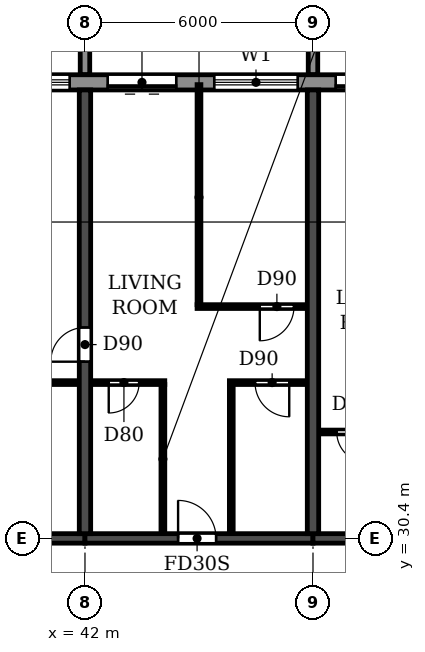
"""IFC4 building model, lengths in metres.
Left out: names, types, materials, properties, quantities, classifications, styles, units other than length and angle.
Written with IfcOpenShell. Run it as: python <this file> out.ifc"""

import sys

from ifc_helpers import new_model, si_unit, direction, frame, frame_2d, origin, place, context, subcontext, project, spatial, polyline, rectangle, outline, extrude, source, transform, mapped, element, fill, save


model = new_model("IFC4")
c1 = context("Model", 3, precision=1e-05, world=origin(), true_north=direction((0.0, 1.0)))
c2 = subcontext(c1, "Body", "Model", "MODEL_VIEW")
j1 = project(units=[si_unit("LENGTHUNIT", "METRE"), si_unit("PLANEANGLEUNIT", "RADIAN")], contexts=[c1])
p1 = place(None, origin())
s1 = spatial("IfcSite", under=j1, at=p1, CompositionType="ELEMENT")
p2 = place(p1, origin())
s2 = spatial("IfcBuilding", under=s1, at=p2, CompositionType="ELEMENT")
p3 = place(p2, frame((0.0, 0.0, 155.4)))
s3 = spatial("IfcBuildingStorey", under=s2, at=p3, CompositionType="ELEMENT", Elevation=155.4)
p4 = place(p3, frame((42.0, 30.525, 0.0), z_axis=(0.0, 0.0, 1.0), x_axis=(0.0, 1.0, 0.0)))
e1 = element("IfcWall", 1, at=p4, inside=s3, PredefinedType="SHEAR", context=c2, shape_type="SweptSolid", body=[
    extrude(rectangle(XDim=11.675, YDim=0.3, at=frame_2d((5.837, 0.0))), origin(), (0.0, 0.0, 1.0), 3.0),
])
p5 = place(p4, frame((4.525, 0.0, 0.0)))
e2 = element("IfcOpeningElement", 2, at=p5, cuts=e1, PredefinedType="OPENING", context=c2, shape_type="SweptSolid", body=[
    extrude(rectangle(XDim=0.9, YDim=2.1, at=frame_2d((0.45, 1.05))), frame((0.0, 0.16, 0.0), z_axis=(0.0, -1.0, 0.0), x_axis=(1.0, 0.0, 0.0)), (0.0, 0.0, 1.0), 0.32),
])
p6 = place(p3, frame((48.0, 30.525, 0.0), z_axis=(0.0, 0.0, 1.0), x_axis=(0.0, 1.0, 0.0)))
e3 = element("IfcWall", 3, at=p6, inside=s3, PredefinedType="SHEAR", context=c2, shape_type="SweptSolid", body=[
    extrude(rectangle(XDim=11.675, YDim=0.3, at=frame_2d((5.837, 0.0))), origin(), (0.0, 0.0, 1.0), 3.0),
])
p7 = place(p3, frame((36.0, 30.4, 0.0), z_axis=(0.0, 0.0, 1.0), x_axis=(1.0, 0.0, 0.0)))
e4 = element("IfcWall", 4, at=p7, inside=s3, PredefinedType="SHEAR", context=c2, shape_type="SweptSolid", body=[
    extrude(rectangle(XDim=6.0, YDim=0.25, at=frame_2d((3.0, 0.0))), origin(), (0.0, 0.0, 1.0), 2.4),
])
p8 = place(p3, frame((42.0, 30.4, 0.0), z_axis=(0.0, 0.0, 1.0), x_axis=(1.0, 0.0, 0.0)))
e5 = element("IfcWall", 5, at=p8, inside=s3, PredefinedType="SHEAR", context=c2, shape_type="SweptSolid", body=[
    extrude(rectangle(XDim=6.0, YDim=0.25, at=frame_2d((3.0, 0.0))), origin(), (0.0, 0.0, 1.0), 2.4),
])
p9 = place(p8, frame((2.45, 0.0, 0.0)))
e6 = element("IfcOpeningElement", 6, at=p9, cuts=e5, PredefinedType="OPENING", context=c2, shape_type="SweptSolid", body=[
    extrude(rectangle(XDim=1.0, YDim=2.1, at=frame_2d((0.5, 1.05))), frame((0.0, 0.135, 0.0), z_axis=(0.0, -1.0, 0.0), x_axis=(1.0, 0.0, 0.0)), (0.0, 0.0, 1.0), 0.27),
])
p10 = place(p3, frame((48.0, 30.4, 0.0), z_axis=(0.0, 0.0, 1.0), x_axis=(1.0, 0.0, 0.0)))
e7 = element("IfcWall", 7, at=p10, inside=s3, PredefinedType="SHEAR", context=c2, shape_type="SweptSolid", body=[
    extrude(rectangle(XDim=6.0, YDim=0.25, at=frame_2d((3.0, 0.0))), origin(), (0.0, 0.0, 1.0), 2.4),
])
p11 = place(p10, frame((2.45, 0.0, 0.0)))
e8 = element("IfcOpeningElement", 8, at=p11, cuts=e7, PredefinedType="OPENING", context=c2, shape_type="SweptSolid", body=[
    extrude(rectangle(XDim=1.0, YDim=2.1, at=frame_2d((0.5, 1.05))), frame((0.0, 0.135, 0.0), z_axis=(0.0, -1.0, 0.0), x_axis=(1.0, 0.0, 0.0)), (0.0, 0.0, 1.0), 0.27),
])
p12 = place(p3, frame((85.317, 42.4, 0.0), z_axis=(0.0, 0.0, 1.0), x_axis=(-1.0, 0.0, 0.0)))
e9 = element("IfcWall", 9, at=p12, inside=s3, PredefinedType="STANDARD", context=c2, shape_type="SweptSolid", body=[
    extrude(rectangle(XDim=68.634, YDim=0.4, at=frame_2d((34.317, 0.0))), origin(), (0.0, 0.0, 1.0), 3.0),
])
p13 = place(p12, frame((64.917, 0.0, 0.0)))
e10 = element("IfcOpeningElement", 10, at=p13, cuts=e9, PredefinedType="OPENING", context=c2, shape_type="SweptSolid", body=[
    extrude(rectangle(XDim=1.8, YDim=2.4, at=frame_2d((0.9, 1.2))), frame((0.0, 0.21, 0.0), z_axis=(0.0, -1.0, 0.0), x_axis=(1.0, 0.0, 0.0)), (0.0, 0.0, 1.0), 0.42),
])
p14 = place(p12, frame((61.717, 0.0, 0.9)))
e11 = element("IfcOpeningElement", 11, at=p14, cuts=e9, PredefinedType="OPENING", context=c2, shape_type="SweptSolid", body=[
    extrude(rectangle(XDim=2.2, YDim=1.5, at=frame_2d((1.1, 0.75))), frame((0.0, 0.21, 0.0), z_axis=(0.0, -1.0, 0.0), x_axis=(1.0, 0.0, 0.0)), (0.0, 0.0, 1.0), 0.42),
])
p15 = place(p12, frame((58.717, 0.0, 0.9)))
e12 = element("IfcOpeningElement", 12, at=p15, cuts=e9, PredefinedType="OPENING", context=c2, shape_type="SweptSolid", body=[
    extrude(rectangle(XDim=2.2, YDim=1.5, at=frame_2d((1.1, 0.75))), frame((0.0, 0.21, 0.0), z_axis=(0.0, -1.0, 0.0), x_axis=(1.0, 0.0, 0.0)), (0.0, 0.0, 1.0), 0.42),
])
p16 = place(p12, frame((55.917, 0.0, 0.0)))
e13 = element("IfcOpeningElement", 13, at=p16, cuts=e9, PredefinedType="OPENING", context=c2, shape_type="SweptSolid", body=[
    extrude(rectangle(XDim=1.8, YDim=2.4, at=frame_2d((0.9, 1.2))), frame((0.0, 0.21, 0.0), z_axis=(0.0, -1.0, 0.0), x_axis=(1.0, 0.0, 0.0)), (0.0, 0.0, 1.0), 0.42),
])
p17 = place(p12, frame((52.917, 0.0, 0.0)))
e14 = element("IfcOpeningElement", 14, at=p17, cuts=e9, PredefinedType="OPENING", context=c2, shape_type="SweptSolid", body=[
    extrude(rectangle(XDim=1.8, YDim=2.4, at=frame_2d((0.9, 1.2))), frame((0.0, 0.21, 0.0), z_axis=(0.0, -1.0, 0.0), x_axis=(1.0, 0.0, 0.0)), (0.0, 0.0, 1.0), 0.42),
])
p18 = place(p12, frame((49.717, 0.0, 0.9)))
e15 = element("IfcOpeningElement", 15, at=p18, cuts=e9, PredefinedType="OPENING", context=c2, shape_type="SweptSolid", body=[
    extrude(rectangle(XDim=2.2, YDim=1.5, at=frame_2d((1.1, 0.75))), frame((0.0, 0.21, 0.0), z_axis=(0.0, -1.0, 0.0), x_axis=(1.0, 0.0, 0.0)), (0.0, 0.0, 1.0), 0.42),
])
p19 = place(p12, frame((46.717, 0.0, 0.9)))
e16 = element("IfcOpeningElement", 16, at=p19, cuts=e9, PredefinedType="OPENING", context=c2, shape_type="SweptSolid", body=[
    extrude(rectangle(XDim=2.2, YDim=1.5, at=frame_2d((1.1, 0.75))), frame((0.0, 0.21, 0.0), z_axis=(0.0, -1.0, 0.0), x_axis=(1.0, 0.0, 0.0)), (0.0, 0.0, 1.0), 0.42),
])
p20 = place(p12, frame((43.717, 0.0, 0.9)))
e17 = element("IfcOpeningElement", 17, at=p20, cuts=e9, PredefinedType="OPENING", context=c2, shape_type="SweptSolid", body=[
    extrude(rectangle(XDim=2.2, YDim=1.5, at=frame_2d((1.1, 0.75))), frame((0.0, 0.21, 0.0), z_axis=(0.0, -1.0, 0.0), x_axis=(1.0, 0.0, 0.0)), (0.0, 0.0, 1.0), 0.42),
])
p21 = place(p12, frame((40.917, 0.0, 0.0)))
e18 = element("IfcOpeningElement", 18, at=p21, cuts=e9, PredefinedType="OPENING", context=c2, shape_type="SweptSolid", body=[
    extrude(rectangle(XDim=1.8, YDim=2.4, at=frame_2d((0.9, 1.2))), frame((0.0, 0.21, 0.0), z_axis=(0.0, -1.0, 0.0), x_axis=(1.0, 0.0, 0.0)), (0.0, 0.0, 1.0), 0.42),
])
p22 = place(p12, frame((37.717, 0.0, 0.9)))
e19 = element("IfcOpeningElement", 19, at=p22, cuts=e9, PredefinedType="OPENING", context=c2, shape_type="SweptSolid", body=[
    extrude(rectangle(XDim=2.2, YDim=1.5, at=frame_2d((1.1, 0.75))), frame((0.0, 0.21, 0.0), z_axis=(0.0, -1.0, 0.0), x_axis=(1.0, 0.0, 0.0)), (0.0, 0.0, 1.0), 0.42),
])
p23 = place(p12, frame((34.917, 0.0, 0.0)))
e20 = element("IfcOpeningElement", 20, at=p23, cuts=e9, PredefinedType="OPENING", context=c2, shape_type="SweptSolid", body=[
    extrude(rectangle(XDim=1.8, YDim=2.4, at=frame_2d((0.9, 1.2))), frame((0.0, 0.21, 0.0), z_axis=(0.0, -1.0, 0.0), x_axis=(1.0, 0.0, 0.0)), (0.0, 0.0, 1.0), 0.42),
])
p24 = place(p12, frame((31.717, 0.0, 0.9)))
e21 = element("IfcOpeningElement", 21, at=p24, cuts=e9, PredefinedType="OPENING", context=c2, shape_type="SweptSolid", body=[
    extrude(rectangle(XDim=2.2, YDim=1.5, at=frame_2d((1.1, 0.75))), frame((0.0, 0.21, 0.0), z_axis=(0.0, -1.0, 0.0), x_axis=(1.0, 0.0, 0.0)), (0.0, 0.0, 1.0), 0.42),
])
p25 = place(p12, frame((28.717, 0.0, 0.9)))
e22 = element("IfcOpeningElement", 22, at=p25, cuts=e9, PredefinedType="OPENING", context=c2, shape_type="SweptSolid", body=[
    extrude(rectangle(XDim=2.2, YDim=1.5, at=frame_2d((1.1, 0.75))), frame((0.0, 0.21, 0.0), z_axis=(0.0, -1.0, 0.0), x_axis=(1.0, 0.0, 0.0)), (0.0, 0.0, 1.0), 0.42),
])
p26 = place(p12, frame((25.717, 0.0, 0.9)))
e23 = element("IfcOpeningElement", 23, at=p26, cuts=e9, PredefinedType="OPENING", context=c2, shape_type="SweptSolid", body=[
    extrude(rectangle(XDim=2.2, YDim=1.5, at=frame_2d((1.1, 0.75))), frame((0.0, 0.21, 0.0), z_axis=(0.0, -1.0, 0.0), x_axis=(1.0, 0.0, 0.0)), (0.0, 0.0, 1.0), 0.42),
])
p27 = place(p12, frame((22.717, 0.0, 0.9)))
e24 = element("IfcOpeningElement", 24, at=p27, cuts=e9, PredefinedType="OPENING", context=c2, shape_type="SweptSolid", body=[
    extrude(rectangle(XDim=2.2, YDim=1.5, at=frame_2d((1.1, 0.75))), frame((0.0, 0.21, 0.0), z_axis=(0.0, -1.0, 0.0), x_axis=(1.0, 0.0, 0.0)), (0.0, 0.0, 1.0), 0.42),
])
p28 = place(p12, frame((19.917, 0.0, 0.0)))
e25 = element("IfcOpeningElement", 25, at=p28, cuts=e9, PredefinedType="OPENING", context=c2, shape_type="SweptSolid", body=[
    extrude(rectangle(XDim=1.8, YDim=2.4, at=frame_2d((0.9, 1.2))), frame((0.0, 0.21, 0.0), z_axis=(0.0, -1.0, 0.0), x_axis=(1.0, 0.0, 0.0)), (0.0, 0.0, 1.0), 0.42),
])
p29 = place(p12, frame((16.717, 0.0, 0.9)))
e26 = element("IfcOpeningElement", 26, at=p29, cuts=e9, PredefinedType="OPENING", context=c2, shape_type="SweptSolid", body=[
    extrude(rectangle(XDim=2.2, YDim=1.5, at=frame_2d((1.1, 0.75))), frame((0.0, 0.21, 0.0), z_axis=(0.0, -1.0, 0.0), x_axis=(1.0, 0.0, 0.0)), (0.0, 0.0, 1.0), 0.42),
])
p30 = place(p12, frame((13.717, 0.0, 0.9)))
e27 = element("IfcOpeningElement", 27, at=p30, cuts=e9, PredefinedType="OPENING", context=c2, shape_type="SweptSolid", body=[
    extrude(rectangle(XDim=2.2, YDim=1.5, at=frame_2d((1.1, 0.75))), frame((0.0, 0.21, 0.0), z_axis=(0.0, -1.0, 0.0), x_axis=(1.0, 0.0, 0.0)), (0.0, 0.0, 1.0), 0.42),
])
p31 = place(p12, frame((10.917, 0.0, 0.0)))
e28 = element("IfcOpeningElement", 28, at=p31, cuts=e9, PredefinedType="OPENING", context=c2, shape_type="SweptSolid", body=[
    extrude(rectangle(XDim=1.8, YDim=2.4, at=frame_2d((0.9, 1.2))), frame((0.0, 0.21, 0.0), z_axis=(0.0, -1.0, 0.0), x_axis=(1.0, 0.0, 0.0)), (0.0, 0.0, 1.0), 0.42),
])
p32 = place(p12, frame((7.717, 0.0, 0.9)))
e29 = element("IfcOpeningElement", 29, at=p32, cuts=e9, PredefinedType="OPENING", context=c2, shape_type="SweptSolid", body=[
    extrude(rectangle(XDim=2.2, YDim=1.5, at=frame_2d((1.1, 0.75))), frame((0.0, 0.21, 0.0), z_axis=(0.0, -1.0, 0.0), x_axis=(1.0, 0.0, 0.0)), (0.0, 0.0, 1.0), 0.42),
])
p33 = place(p12, frame((4.717, 0.0, 0.9)))
e30 = element("IfcOpeningElement", 30, at=p33, cuts=e9, PredefinedType="OPENING", context=c2, shape_type="SweptSolid", body=[
    extrude(rectangle(XDim=2.2, YDim=1.5, at=frame_2d((1.1, 0.75))), frame((0.0, 0.21, 0.0), z_axis=(0.0, -1.0, 0.0), x_axis=(1.0, 0.0, 0.0)), (0.0, 0.0, 1.0), 0.42),
])
p34 = place(p12, frame((1.917, 0.0, 0.0)))
e31 = element("IfcOpeningElement", 31, at=p34, cuts=e9, PredefinedType="OPENING", context=c2, shape_type="SweptSolid", body=[
    extrude(rectangle(XDim=1.8, YDim=2.4, at=frame_2d((0.9, 1.2))), frame((0.0, 0.21, 0.0), z_axis=(0.0, -1.0, 0.0), x_axis=(1.0, 0.0, 0.0)), (0.0, 0.0, 1.0), 0.42),
])
m1 = source(origin(), c2, "Body", "SweptSolid", [
    extrude(outline(polyline([(0.0, 0.0), (0.25, 0.0), (0.25, 3.1), (0.0, 3.1), (0.0, 0.0)])), origin(), (0.0, 0.0, 1.0), 3.1),
])
for number, where in (
    (32, (41.875, 42.6, 0.0)),
    (33, (47.875, 42.6, 0.0)),
):
    element("IfcWall", number, at=place(p3, frame(where)), inside=s3, PredefinedType="STANDARD", context=c2, shape_type="MappedRepresentation", body=[
        mapped(m1, transform((0.0, 0.0, 0.0))),
    ])
p35 = place(p3, frame((48.16, 33.2, 0.0), z_axis=(0.0, 0.0, 1.0), x_axis=(1.0, 0.0, 0.0)))
e34 = element("IfcWall", 34, at=p35, inside=s3, PredefinedType="PARTITIONING", context=c2, shape_type="SweptSolid", body=[
    extrude(rectangle(XDim=1.94, YDim=0.1, at=frame_2d((0.97, 0.0))), origin(), (0.0, 0.0, 1.0), 3.0),
])
p36 = place(p35, frame((0.465, 0.0, 0.0)))
e35 = element("IfcOpeningElement", 35, at=p36, cuts=e34, PredefinedType="OPENING", context=c2, shape_type="SweptSolid", body=[
    extrude(rectangle(XDim=0.8, YDim=2.1, at=frame_2d((0.4, 1.05))), frame((0.0, 0.06, 0.0), z_axis=(0.0, -1.0, 0.0), x_axis=(1.0, 0.0, 0.0)), (0.0, 0.0, 1.0), 0.12),
])
p37 = place(p3, frame((38.9, 34.5, 0.0), z_axis=(0.0, 0.0, 1.0), x_axis=(1.0, 0.0, 0.0)))
e36 = element("IfcWall", 36, at=p37, inside=s3, PredefinedType="PARTITIONING", context=c2, shape_type="SweptSolid", body=[
    extrude(rectangle(XDim=2.94, YDim=0.1, at=frame_2d((1.47, 0.0))), origin(), (0.0, 0.0, 1.0), 3.0),
])
p38 = place(p37, frame((1.2, 0.0, 0.0)))
e37 = element("IfcOpeningElement", 37, at=p38, cuts=e36, PredefinedType="OPENING", context=c2, shape_type="SweptSolid", body=[
    extrude(rectangle(XDim=0.8, YDim=2.1, at=frame_2d((0.4, 1.05))), frame((0.0, 0.06, 0.0), z_axis=(0.0, -1.0, 0.0), x_axis=(1.0, 0.0, 0.0)), (0.0, 0.0, 1.0), 0.12),
])
p39 = place(p3, frame((42.16, 34.5, 0.0), z_axis=(0.0, 0.0, 1.0), x_axis=(1.0, 0.0, 0.0)))
e38 = element("IfcWall", 38, at=p39, inside=s3, PredefinedType="PARTITIONING", context=c2, shape_type="SweptSolid", body=[
    extrude(rectangle(XDim=1.94, YDim=0.1, at=frame_2d((0.97, 0.0))), origin(), (0.0, 0.0, 1.0), 3.0),
])
p40 = place(p39, frame((0.465, 0.0, 0.0)))
e39 = element("IfcOpeningElement", 39, at=p40, cuts=e38, PredefinedType="OPENING", context=c2, shape_type="SweptSolid", body=[
    extrude(rectangle(XDim=0.8, YDim=2.1, at=frame_2d((0.4, 1.05))), frame((0.0, 0.06, 0.0), z_axis=(0.0, -1.0, 0.0), x_axis=(1.0, 0.0, 0.0)), (0.0, 0.0, 1.0), 0.12),
])
p41 = place(p3, frame((45.8, 34.5, 0.0), z_axis=(0.0, 0.0, 1.0), x_axis=(1.0, 0.0, 0.0)))
e40 = element("IfcWall", 40, at=p41, inside=s3, PredefinedType="PARTITIONING", context=c2, shape_type="SweptSolid", body=[
    extrude(rectangle(XDim=2.04, YDim=0.1, at=frame_2d((1.02, 0.0))), origin(), (0.0, 0.0, 1.0), 3.0),
])
p42 = place(p41, frame((0.675, 0.0, 0.0)))
e41 = element("IfcOpeningElement", 41, at=p42, cuts=e40, PredefinedType="OPENING", context=c2, shape_type="SweptSolid", body=[
    extrude(rectangle(XDim=0.9, YDim=2.1, at=frame_2d((0.45, 1.05))), frame((0.0, 0.06, 0.0), z_axis=(0.0, -1.0, 0.0), x_axis=(1.0, 0.0, 0.0)), (0.0, 0.0, 1.0), 0.12),
])
p43 = place(p3, frame((44.95, 36.5, 0.0), z_axis=(0.0, 0.0, 1.0), x_axis=(1.0, 0.0, 0.0)))
e42 = element("IfcWall", 42, at=p43, inside=s3, PredefinedType="PARTITIONING", context=c2, shape_type="SweptSolid", body=[
    extrude(rectangle(XDim=2.89, YDim=0.1, at=frame_2d((1.445, 0.0))), origin(), (0.0, 0.0, 1.0), 3.0),
])
p44 = place(p43, frame((1.65, 0.0, 0.0)))
e43 = element("IfcOpeningElement", 43, at=p44, cuts=e42, PredefinedType="OPENING", context=c2, shape_type="SweptSolid", body=[
    extrude(rectangle(XDim=0.9, YDim=2.1, at=frame_2d((0.45, 1.05))), frame((0.0, 0.06, 0.0), z_axis=(0.0, -1.0, 0.0), x_axis=(1.0, 0.0, 0.0)), (0.0, 0.0, 1.0), 0.12),
])
p45 = place(p3, frame((44.05, 30.535, 0.0), z_axis=(0.0, 0.0, 1.0), x_axis=(0.0, 1.0, 0.0)))
e44 = element("IfcWall", 44, at=p45, inside=s3, PredefinedType="PARTITIONING", context=c2, shape_type="SweptSolid", body=[
    extrude(rectangle(XDim=3.915, YDim=0.1, at=frame_2d((1.958, 0.0))), origin(), (0.0, 0.0, 1.0), 3.0),
])
p46 = place(p3, frame((45.0, 36.55, 0.0), z_axis=(0.0, 0.0, 1.0), x_axis=(0.0, 1.0, 0.0)))
e45 = element("IfcWall", 45, at=p46, inside=s3, PredefinedType="PARTITIONING", context=c2, shape_type="SweptSolid", body=[
    extrude(rectangle(XDim=5.79, YDim=0.1, at=frame_2d((2.895, 0.0))), origin(), (0.0, 0.0, 1.0), 3.0),
])
p47 = place(p3, frame((45.85, 30.535, 0.0), z_axis=(0.0, 0.0, 1.0), x_axis=(0.0, 1.0, 0.0)))
e46 = element("IfcWall", 46, at=p47, inside=s3, PredefinedType="PARTITIONING", context=c2, shape_type="SweptSolid", body=[
    extrude(rectangle(XDim=3.915, YDim=0.1, at=frame_2d((1.958, 0.0))), origin(), (0.0, 0.0, 1.0), 3.0),
])
p48 = place(p20, origin())
e47 = element("IfcWindow", 47, at=p48, inside=s3, PartitioningType="DOUBLE_PANEL_HORIZONTAL", PredefinedType="WINDOW", context=c2, shape_type="SweptSolid", body=[
    extrude(rectangle(XDim=2.2, YDim=1.5, at=frame_2d((1.1, 0.75))), frame((0.0, 0.03, 0.0), z_axis=(0.0, -1.0, 0.0), x_axis=(1.0, 0.0, 0.0)), (0.0, 0.0, 1.0), 0.06),
])
fill(e17, e47)
p49 = place(p21, origin())
e48 = element("IfcDoor", 48, at=p49, inside=s3, OperationType="DOUBLE_DOOR_SLIDING", PredefinedType="DOOR", context=c2, shape_type="SweptSolid", body=[
    extrude(rectangle(XDim=1.8, YDim=2.4, at=frame_2d((0.9, 1.2))), frame((0.0, 0.025, 0.0), z_axis=(0.0, -1.0, 0.0), x_axis=(1.0, 0.0, 0.0)), (0.0, 0.0, 1.0), 0.05),
])
fill(e18, e48)
p50 = place(p22, origin())
e49 = element("IfcWindow", 49, at=p50, inside=s3, PartitioningType="DOUBLE_PANEL_HORIZONTAL", PredefinedType="WINDOW", context=c2, shape_type="SweptSolid", body=[
    extrude(rectangle(XDim=2.2, YDim=1.5, at=frame_2d((1.1, 0.75))), frame((0.0, 0.03, 0.0), z_axis=(0.0, -1.0, 0.0), x_axis=(1.0, 0.0, 0.0)), (0.0, 0.0, 1.0), 0.06),
])
fill(e19, e49)
p51 = place(p23, origin())
e50 = element("IfcDoor", 50, at=p51, inside=s3, OperationType="DOUBLE_DOOR_SLIDING", PredefinedType="DOOR", context=c2, shape_type="SweptSolid", body=[
    extrude(rectangle(XDim=1.8, YDim=2.4, at=frame_2d((0.9, 1.2))), frame((0.0, 0.025, 0.0), z_axis=(0.0, -1.0, 0.0), x_axis=(1.0, 0.0, 0.0)), (0.0, 0.0, 1.0), 0.05),
])
fill(e20, e50)
p52 = place(p5, origin())
e51 = element("IfcDoor", 51, at=p52, inside=s3, OperationType="SINGLE_SWING_LEFT", PredefinedType="DOOR", context=c2, shape_type="SweptSolid", body=[
    extrude(rectangle(XDim=0.9, YDim=2.1, at=frame_2d((0.45, 1.05))), frame((0.0, 0.025, 0.0), z_axis=(0.0, -1.0, 0.0), x_axis=(1.0, 0.0, 0.0)), (0.0, 0.0, 1.0), 0.05),
])
fill(e2, e51)
p53 = place(p40, frame((0.8, 0.0, 0.0), z_axis=(0.0, 0.0, 1.0), x_axis=(-1.0, 0.0, 0.0)))
e52 = element("IfcDoor", 52, at=p53, inside=s3, OperationType="SINGLE_SWING_RIGHT", PredefinedType="DOOR", context=c2, shape_type="SweptSolid", body=[
    extrude(rectangle(XDim=0.8, YDim=2.1, at=frame_2d((0.4, 1.05))), frame((0.0, 0.025, 0.0), z_axis=(0.0, -1.0, 0.0), x_axis=(1.0, 0.0, 0.0)), (0.0, 0.0, 1.0), 0.05),
])
fill(e39, e52)
p54 = place(p9, origin())
e53 = element("IfcDoor", 53, at=p54, inside=s3, OperationType="SINGLE_SWING_LEFT", PredefinedType="DOOR", context=c2, shape_type="SweptSolid", body=[
    extrude(rectangle(XDim=1.0, YDim=2.1, at=frame_2d((0.5, 1.05))), frame((0.0, 0.025, 0.0), z_axis=(0.0, -1.0, 0.0), x_axis=(1.0, 0.0, 0.0)), (0.0, 0.0, 1.0), 0.05),
])
fill(e6, e53)
p55 = place(p42, frame((0.9, 0.0, 0.0), z_axis=(0.0, 0.0, 1.0), x_axis=(-1.0, 0.0, 0.0)))
e54 = element("IfcDoor", 54, at=p55, inside=s3, OperationType="SINGLE_SWING_LEFT", PredefinedType="DOOR", context=c2, shape_type="SweptSolid", body=[
    extrude(rectangle(XDim=0.9, YDim=2.1, at=frame_2d((0.45, 1.05))), frame((0.0, 0.025, 0.0), z_axis=(0.0, -1.0, 0.0), x_axis=(1.0, 0.0, 0.0)), (0.0, 0.0, 1.0), 0.05),
])
fill(e41, e54)
p56 = place(p44, frame((0.9, 0.0, 0.0), z_axis=(0.0, 0.0, 1.0), x_axis=(-1.0, 0.0, 0.0)))
e55 = element("IfcDoor", 55, at=p56, inside=s3, OperationType="SINGLE_SWING_RIGHT", PredefinedType="DOOR", context=c2, shape_type="SweptSolid", body=[
    extrude(rectangle(XDim=0.9, YDim=2.1, at=frame_2d((0.45, 1.05))), frame((0.0, 0.025, 0.0), z_axis=(0.0, -1.0, 0.0), x_axis=(1.0, 0.0, 0.0)), (0.0, 0.0, 1.0), 0.05),
])
fill(e43, e55)
p57 = place(p36, frame((0.8, 0.0, 0.0), z_axis=(0.0, 0.0, 1.0), x_axis=(-1.0, 0.0, 0.0)))
e56 = element("IfcDoor", 56, at=p57, inside=s3, OperationType="SINGLE_SWING_LEFT", PredefinedType="DOOR", context=c2, shape_type="SweptSolid", body=[
    extrude(rectangle(XDim=0.8, YDim=2.1, at=frame_2d((0.4, 1.05))), frame((0.0, 0.025, 0.0), z_axis=(0.0, -1.0, 0.0), x_axis=(1.0, 0.0, 0.0)), (0.0, 0.0, 1.0), 0.05),
])
fill(e35, e56)
save(model, sys.argv[1])
